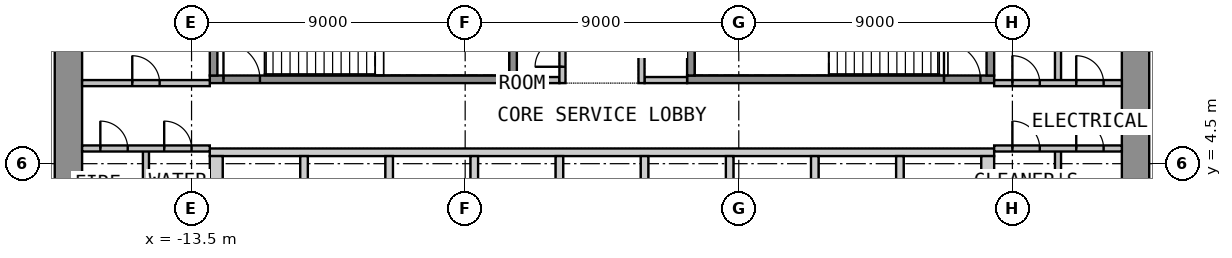
"""IFC4 building model, lengths in metres.
Left out: names, types, materials, properties, quantities, classifications, styles, units other than length and angle.
Written with IfcOpenShell. Run it as: python <this file> out.ifc"""

import sys

from ifc_helpers import new_model, si_unit, direction, frame, frame_2d, origin, place, context, subcontext, project, spatial, polyline, rectangle, outline, extrude, element, fill, save


model = new_model("IFC4")
c1 = context("Model", 3, precision=1e-05, world=origin(), true_north=direction((0.0, 1.0)))
c2 = subcontext(c1, "Body", "Model", "MODEL_VIEW")
j1 = project(units=[si_unit("LENGTHUNIT", "METRE"), si_unit("PLANEANGLEUNIT", "RADIAN")], contexts=[c1])
p1 = place(None, origin())
s1 = spatial("IfcSite", under=j1, at=p1, CompositionType="ELEMENT")
p2 = place(p1, origin())
s2 = spatial("IfcBuilding", under=s1, at=p2, CompositionType="ELEMENT")
p3 = place(p2, frame((0.0, 0.0, 6.0)))
s3 = spatial("IfcBuildingStorey", under=s2, at=p3, CompositionType="ELEMENT", Elevation=6.0)
p4 = place(p3, frame((-17.55, -12.6, 0.0), z_axis=(0.0, 0.0, 1.0), x_axis=(0.0, 1.0, 0.0)))
e1 = element("IfcWall", 1, at=p4, inside=s3, PredefinedType="SHEAR", context=c2, shape_type="SweptSolid", body=[
    extrude(rectangle(XDim=25.2, YDim=0.9, at=frame_2d((12.6, 0.0))), origin(), (0.0, 0.0, 1.0), 4.4),
])
p5 = place(p4, frame((11.4, 0.0, 0.0)))
e2 = element("IfcOpeningElement", 2, at=p5, cuts=e1, PredefinedType="OPENING", context=c2, shape_type="SweptSolid", body=[
    extrude(rectangle(XDim=2.4, YDim=2.1, at=frame_2d((1.2, 1.05))), frame((0.0, 0.46, 0.0), z_axis=(0.0, -1.0, 0.0), x_axis=(1.0, 0.0, 0.0)), (0.0, 0.0, 1.0), 0.92),
])
p6 = place(p3, frame((17.55, -12.6, 0.0), z_axis=(0.0, 0.0, 1.0), x_axis=(0.0, 1.0, 0.0)))
e3 = element("IfcWall", 3, at=p6, inside=s3, PredefinedType="SHEAR", context=c2, shape_type="SweptSolid", body=[
    extrude(rectangle(XDim=25.2, YDim=0.9, at=frame_2d((12.6, 0.0))), origin(), (0.0, 0.0, 1.0), 4.4),
])
p7 = place(p6, frame((11.4, 0.0, 0.0)))
e4 = element("IfcOpeningElement", 4, at=p7, cuts=e3, PredefinedType="OPENING", context=c2, shape_type="SweptSolid", body=[
    extrude(rectangle(XDim=2.4, YDim=2.1, at=frame_2d((1.2, 1.05))), frame((0.0, 0.46, 0.0), z_axis=(0.0, -1.0, 0.0), x_axis=(1.0, 0.0, 0.0)), (0.0, 0.0, 1.0), 0.92),
])
p8 = place(p3, origin())
e5 = element("IfcWall", 5, at=p8, inside=s3, PredefinedType="SHEAR", context=c2, shape_type="SweptSolid", body=[
    extrude(outline(polyline([(-12.9, 4.75), (12.9, 4.75), (12.9, 5.0), (-12.9, 5.0), (-12.9, 4.75)])), origin(), (0.0, 0.0, 1.0), 4.4),
])
p9 = place(p3, origin())
e6 = element("IfcWall", 6, at=p9, inside=s3, PredefinedType="SHEAR", context=c2, shape_type="SweptSolid", body=[
    extrude(outline(polyline([(-12.9, 2.05), (-12.475, 2.05), (-12.475, 4.75), (-12.9, 4.75), (-12.9, 2.05)])), origin(), (0.0, 0.0, 1.0), 4.4),
])
p10 = place(p3, origin())
e7 = element("IfcWall", 7, at=p10, inside=s3, PredefinedType="SHEAR", context=c2, shape_type="SweptSolid", body=[
    extrude(outline(polyline([(-9.925, 2.05), (-9.675, 2.05), (-9.675, 4.75), (-9.925, 4.75), (-9.925, 2.05)])), origin(), (0.0, 0.0, 1.0), 4.4),
])
p11 = place(p3, origin())
e8 = element("IfcWall", 8, at=p11, inside=s3, PredefinedType="SHEAR", context=c2, shape_type="SweptSolid", body=[
    extrude(outline(polyline([(-7.125, 2.05), (-6.875, 2.05), (-6.875, 4.75), (-7.125, 4.75), (-7.125, 2.05)])), origin(), (0.0, 0.0, 1.0), 4.4),
])
p12 = place(p3, origin())
e9 = element("IfcWall", 9, at=p12, inside=s3, PredefinedType="SHEAR", context=c2, shape_type="SweptSolid", body=[
    extrude(outline(polyline([(-4.325, 2.05), (-4.075, 2.05), (-4.075, 4.75), (-4.325, 4.75), (-4.325, 2.05)])), origin(), (0.0, 0.0, 1.0), 4.4),
])
p13 = place(p3, origin())
e10 = element("IfcWall", 10, at=p13, inside=s3, PredefinedType="SHEAR", context=c2, shape_type="SweptSolid", body=[
    extrude(outline(polyline([(-1.525, 2.05), (-1.275, 2.05), (-1.275, 4.75), (-1.525, 4.75), (-1.525, 2.05)])), origin(), (0.0, 0.0, 1.0), 4.4),
])
p14 = place(p3, origin())
e11 = element("IfcWall", 11, at=p14, inside=s3, PredefinedType="SHEAR", context=c2, shape_type="SweptSolid", body=[
    extrude(outline(polyline([(1.275, 2.05), (1.525, 2.05), (1.525, 4.75), (1.275, 4.75), (1.275, 2.05)])), origin(), (0.0, 0.0, 1.0), 4.4),
])
p15 = place(p3, origin())
e12 = element("IfcWall", 12, at=p15, inside=s3, PredefinedType="SHEAR", context=c2, shape_type="SweptSolid", body=[
    extrude(outline(polyline([(4.075, 2.05), (4.325, 2.05), (4.325, 4.75), (4.075, 4.75), (4.075, 2.05)])), origin(), (0.0, 0.0, 1.0), 4.4),
])
p16 = place(p3, origin())
e13 = element("IfcWall", 13, at=p16, inside=s3, PredefinedType="SHEAR", context=c2, shape_type="SweptSolid", body=[
    extrude(outline(polyline([(6.875, 2.05), (7.125, 2.05), (7.125, 4.75), (6.875, 4.75), (6.875, 2.05)])), origin(), (0.0, 0.0, 1.0), 4.4),
])
p17 = place(p3, origin())
e14 = element("IfcWall", 14, at=p17, inside=s3, PredefinedType="SHEAR", context=c2, shape_type="SweptSolid", body=[
    extrude(outline(polyline([(9.675, 2.05), (9.925, 2.05), (9.925, 4.75), (9.675, 4.75), (9.675, 2.05)])), origin(), (0.0, 0.0, 1.0), 4.4),
])
p18 = place(p3, origin())
e15 = element("IfcWall", 15, at=p18, inside=s3, PredefinedType="SHEAR", context=c2, shape_type="SweptSolid", body=[
    extrude(outline(polyline([(12.475, 2.05), (12.9, 2.05), (12.9, 4.75), (12.475, 4.75), (12.475, 2.05)])), origin(), (0.0, 0.0, 1.0), 4.4),
])
p19 = place(p3, frame((-12.9, 7.275, 0.0), z_axis=(0.0, 0.0, 1.0), x_axis=(1.0, 0.0, 0.0)))
e16 = element("IfcWall", 16, at=p19, inside=s3, PredefinedType="SHEAR", context=c2, shape_type="SweptSolid", body=[
    extrude(rectangle(XDim=10.1, YDim=0.25, at=frame_2d((5.05, 0.0))), origin(), (0.0, 0.0, 1.0), 4.4),
])
p20 = place(p19, frame((0.45, 0.0, 0.0)))
e17 = element("IfcOpeningElement", 17, at=p20, cuts=e16, PredefinedType="OPENING", context=c2, shape_type="SweptSolid", body=[
    extrude(rectangle(XDim=1.2, YDim=2.1, at=frame_2d((0.6, 1.05))), frame((0.0, 0.135, 0.0), z_axis=(0.0, -1.0, 0.0), x_axis=(1.0, 0.0, 0.0)), (0.0, 0.0, 1.0), 0.27),
])
for number, where, z_axis, x_axis in (
    (18, (-12.775, 7.4, 0.0), (0.0, 0.0, 1.0), (0.0, 1.0, 0.0)),
    (19, (-2.925, 7.4, 0.0), (0.0, 0.0, 1.0), (0.0, 1.0, 0.0)),
):
    element("IfcWall", number, at=place(p3, frame(where, z_axis=z_axis, x_axis=x_axis)), inside=s3, PredefinedType="SHEAR", context=c2, shape_type="SweptSolid", body=[
        extrude(rectangle(XDim=3.25, YDim=0.25, at=frame_2d((1.625, 0.0))), origin(), (0.0, 0.0, 1.0), 4.4),
    ])
p21 = place(p3, frame((2.8, 7.275, 0.0), z_axis=(0.0, 0.0, 1.0), x_axis=(1.0, 0.0, 0.0)))
e20 = element("IfcWall", 20, at=p21, inside=s3, PredefinedType="SHEAR", context=c2, shape_type="SweptSolid", body=[
    extrude(rectangle(XDim=10.1, YDim=0.25, at=frame_2d((5.05, 0.0))), origin(), (0.0, 0.0, 1.0), 4.4),
])
p22 = place(p21, frame((8.45, 0.0, 0.0)))
e21 = element("IfcOpeningElement", 21, at=p22, cuts=e20, PredefinedType="OPENING", context=c2, shape_type="SweptSolid", body=[
    extrude(rectangle(XDim=1.2, YDim=2.1, at=frame_2d((0.6, 1.05))), frame((0.0, 0.135, 0.0), z_axis=(0.0, -1.0, 0.0), x_axis=(1.0, 0.0, 0.0)), (0.0, 0.0, 1.0), 0.27),
])
for number, where, z_axis, x_axis in (
    (22, (2.925, 7.4, 0.0), (0.0, 0.0, 1.0), (0.0, 1.0, 0.0)),
    (23, (12.775, 7.4, 0.0), (0.0, 0.0, 1.0), (0.0, 1.0, 0.0)),
):
    element("IfcWall", number, at=place(p3, frame(where, z_axis=z_axis, x_axis=x_axis)), inside=s3, PredefinedType="SHEAR", context=c2, shape_type="SweptSolid", body=[
        extrude(rectangle(XDim=3.25, YDim=0.25, at=frame_2d((1.625, 0.0))), origin(), (0.0, 0.0, 1.0), 4.4),
    ])
for number, where, z_axis, x_axis in (
    (24, (-2.8, 7.25, 0.0), (0.0, 0.0, 1.0), (1.0, 0.0, 0.0)),
    (25, (1.4, 7.25, 0.0), (0.0, 0.0, 1.0), (1.0, 0.0, 0.0)),
):
    element("IfcWall", number, at=place(p3, frame(where, z_axis=z_axis, x_axis=x_axis)), inside=s3, PredefinedType="PARTITIONING", context=c2, shape_type="SweptSolid", body=[
        extrude(rectangle(XDim=1.4, YDim=0.2, at=frame_2d((0.7, 0.0))), origin(), (0.0, 0.0, 1.0), 4.4),
    ])
p23 = place(p3, frame((-1.3, 7.15, 0.0), z_axis=(0.0, 0.0, 1.0), x_axis=(0.0, 1.0, 0.0)))
e26 = element("IfcWall", 26, at=p23, inside=s3, PredefinedType="PARTITIONING", context=c2, shape_type="SweptSolid", body=[
    extrude(rectangle(XDim=5.45, YDim=0.2, at=frame_2d((2.725, 0.0))), origin(), (0.0, 0.0, 1.0), 4.4),
])
p24 = place(p23, frame((0.538, 0.0, 0.0)))
e27 = element("IfcOpeningElement", 27, at=p24, cuts=e26, PredefinedType="OPENING", context=c2, shape_type="SweptSolid", body=[
    extrude(rectangle(XDim=0.9, YDim=2.1, at=frame_2d((0.45, 1.05))), frame((0.0, 0.11, 0.0), z_axis=(0.0, -1.0, 0.0), x_axis=(1.0, 0.0, 0.0)), (0.0, 0.0, 1.0), 0.22),
])
p25 = place(p23, frame((3.163, 0.0, 0.0)))
e28 = element("IfcOpeningElement", 28, at=p25, cuts=e26, PredefinedType="OPENING", context=c2, shape_type="SweptSolid", body=[
    extrude(rectangle(XDim=0.9, YDim=2.1, at=frame_2d((0.45, 1.05))), frame((0.0, 0.11, 0.0), z_axis=(0.0, -1.0, 0.0), x_axis=(1.0, 0.0, 0.0)), (0.0, 0.0, 1.0), 0.22),
])
p26 = place(p3, frame((1.3, 7.15, 0.0), z_axis=(0.0, 0.0, 1.0), x_axis=(0.0, 1.0, 0.0)))
e29 = element("IfcWall", 29, at=p26, inside=s3, PredefinedType="PARTITIONING", context=c2, shape_type="SweptSolid", body=[
    extrude(rectangle(XDim=5.45, YDim=0.2, at=frame_2d((2.725, 0.0))), origin(), (0.0, 0.0, 1.0), 4.4),
])
p27 = place(p26, frame((2.375, 0.0, 0.0)))
e30 = element("IfcOpeningElement", 30, at=p27, cuts=e29, PredefinedType="OPENING", context=c2, shape_type="SweptSolid", body=[
    extrude(rectangle(XDim=0.9, YDim=2.1, at=frame_2d((0.45, 1.05))), frame((0.0, 0.11, 0.0), z_axis=(0.0, -1.0, 0.0), x_axis=(1.0, 0.0, 0.0)), (0.0, 0.0, 1.0), 0.22),
])
p28 = place(p3, frame((-17.1, 7.15, 0.0), z_axis=(0.0, 0.0, 1.0), x_axis=(1.0, 0.0, 0.0)))
e31 = element("IfcWall", 31, at=p28, inside=s3, PredefinedType="PARTITIONING", context=c2, shape_type="SweptSolid", body=[
    extrude(rectangle(XDim=4.2, YDim=0.2, at=frame_2d((2.1, 0.0))), origin(), (0.0, 0.0, 1.0), 4.4),
])
p29 = place(p28, frame((1.65, 0.0, 0.0)))
e32 = element("IfcOpeningElement", 32, at=p29, cuts=e31, PredefinedType="OPENING", context=c2, shape_type="SweptSolid", body=[
    extrude(rectangle(XDim=0.9, YDim=2.1, at=frame_2d((0.45, 1.05))), frame((0.0, 0.11, 0.0), z_axis=(0.0, -1.0, 0.0), x_axis=(1.0, 0.0, 0.0)), (0.0, 0.0, 1.0), 0.22),
])
p30 = place(p3, frame((-15.0, 1.8, 0.0), z_axis=(0.0, 0.0, 1.0), x_axis=(0.0, 1.0, 0.0)))
e33 = element("IfcWall", 33, at=p30, inside=s3, PredefinedType="PARTITIONING", context=c2, shape_type="SweptSolid", body=[
    extrude(rectangle(XDim=3.2, YDim=0.2, at=frame_2d((1.6, 0.0))), origin(), (0.0, 0.0, 1.0), 4.4),
])
p31 = place(p3, frame((-17.1, 5.0, 0.0), z_axis=(0.0, 0.0, 1.0), x_axis=(1.0, 0.0, 0.0)))
e34 = element("IfcWall", 34, at=p31, inside=s3, PredefinedType="PARTITIONING", context=c2, shape_type="SweptSolid", body=[
    extrude(rectangle(XDim=4.2, YDim=0.2, at=frame_2d((2.1, 0.0))), origin(), (0.0, 0.0, 1.0), 4.4),
])
p32 = place(p31, frame((0.6, 0.0, 0.0)))
e35 = element("IfcOpeningElement", 35, at=p32, cuts=e34, PredefinedType="OPENING", context=c2, shape_type="SweptSolid", body=[
    extrude(rectangle(XDim=0.9, YDim=2.1, at=frame_2d((0.45, 1.05))), frame((0.0, 0.11, 0.0), z_axis=(0.0, -1.0, 0.0), x_axis=(1.0, 0.0, 0.0)), (0.0, 0.0, 1.0), 0.22),
])
p33 = place(p31, frame((2.7, 0.0, 0.0)))
e36 = element("IfcOpeningElement", 36, at=p33, cuts=e34, PredefinedType="OPENING", context=c2, shape_type="SweptSolid", body=[
    extrude(rectangle(XDim=0.9, YDim=2.1, at=frame_2d((0.45, 1.05))), frame((0.0, 0.11, 0.0), z_axis=(0.0, -1.0, 0.0), x_axis=(1.0, 0.0, 0.0)), (0.0, 0.0, 1.0), 0.22),
])
p34 = place(p3, frame((15.0, 7.15, 0.0), z_axis=(0.0, 0.0, 1.0), x_axis=(0.0, 1.0, 0.0)))
e37 = element("IfcWall", 37, at=p34, inside=s3, PredefinedType="PARTITIONING", context=c2, shape_type="SweptSolid", body=[
    extrude(rectangle(XDim=5.45, YDim=0.2, at=frame_2d((2.725, 0.0))), origin(), (0.0, 0.0, 1.0), 4.4),
])
p35 = place(p3, frame((12.9, 7.15, 0.0), z_axis=(0.0, 0.0, 1.0), x_axis=(1.0, 0.0, 0.0)))
e38 = element("IfcWall", 38, at=p35, inside=s3, PredefinedType="PARTITIONING", context=c2, shape_type="SweptSolid", body=[
    extrude(rectangle(XDim=4.2, YDim=0.2, at=frame_2d((2.1, 0.0))), origin(), (0.0, 0.0, 1.0), 4.4),
])
p36 = place(p35, frame((0.6, 0.0, 0.0)))
e39 = element("IfcOpeningElement", 39, at=p36, cuts=e38, PredefinedType="OPENING", context=c2, shape_type="SweptSolid", body=[
    extrude(rectangle(XDim=0.9, YDim=2.1, at=frame_2d((0.45, 1.05))), frame((0.0, 0.11, 0.0), z_axis=(0.0, -1.0, 0.0), x_axis=(1.0, 0.0, 0.0)), (0.0, 0.0, 1.0), 0.22),
])
p37 = place(p35, frame((2.7, 0.0, 0.0)))
e40 = element("IfcOpeningElement", 40, at=p37, cuts=e38, PredefinedType="OPENING", context=c2, shape_type="SweptSolid", body=[
    extrude(rectangle(XDim=0.9, YDim=2.1, at=frame_2d((0.45, 1.05))), frame((0.0, 0.11, 0.0), z_axis=(0.0, -1.0, 0.0), x_axis=(1.0, 0.0, 0.0)), (0.0, 0.0, 1.0), 0.22),
])
p38 = place(p3, frame((15.0, 1.8, 0.0), z_axis=(0.0, 0.0, 1.0), x_axis=(0.0, 1.0, 0.0)))
e41 = element("IfcWall", 41, at=p38, inside=s3, PredefinedType="PARTITIONING", context=c2, shape_type="SweptSolid", body=[
    extrude(rectangle(XDim=3.2, YDim=0.2, at=frame_2d((1.6, 0.0))), origin(), (0.0, 0.0, 1.0), 4.4),
])
p39 = place(p3, frame((12.9, 5.0, 0.0), z_axis=(0.0, 0.0, 1.0), x_axis=(1.0, 0.0, 0.0)))
e42 = element("IfcWall", 42, at=p39, inside=s3, PredefinedType="PARTITIONING", context=c2, shape_type="SweptSolid", body=[
    extrude(rectangle(XDim=4.2, YDim=0.2, at=frame_2d((2.1, 0.0))), origin(), (0.0, 0.0, 1.0), 4.4),
])
p40 = place(p39, frame((0.6, 0.0, 0.0)))
e43 = element("IfcOpeningElement", 43, at=p40, cuts=e42, PredefinedType="OPENING", context=c2, shape_type="SweptSolid", body=[
    extrude(rectangle(XDim=0.9, YDim=2.1, at=frame_2d((0.45, 1.05))), frame((0.0, 0.11, 0.0), z_axis=(0.0, -1.0, 0.0), x_axis=(1.0, 0.0, 0.0)), (0.0, 0.0, 1.0), 0.22),
])
p41 = place(p39, frame((2.7, 0.0, 0.0)))
e44 = element("IfcOpeningElement", 44, at=p41, cuts=e42, PredefinedType="OPENING", context=c2, shape_type="SweptSolid", body=[
    extrude(rectangle(XDim=0.9, YDim=2.1, at=frame_2d((0.45, 1.05))), frame((0.0, 0.11, 0.0), z_axis=(0.0, -1.0, 0.0), x_axis=(1.0, 0.0, 0.0)), (0.0, 0.0, 1.0), 0.22),
])
p42 = place(p20, origin())
e45 = element("IfcDoor", 45, at=p42, inside=s3, OperationType="SINGLE_SWING_LEFT", PredefinedType="DOOR", context=c2, shape_type="SweptSolid", body=[
    extrude(rectangle(XDim=1.2, YDim=2.1, at=frame_2d((0.6, 1.05))), frame((0.0, 0.025, 0.0), z_axis=(0.0, -1.0, 0.0), x_axis=(1.0, 0.0, 0.0)), (0.0, 0.0, 1.0), 0.05),
])
fill(e17, e45)
p43 = place(p22, origin())
e46 = element("IfcDoor", 46, at=p43, inside=s3, OperationType="SINGLE_SWING_LEFT", PredefinedType="DOOR", context=c2, shape_type="SweptSolid", body=[
    extrude(rectangle(XDim=1.2, YDim=2.1, at=frame_2d((0.6, 1.05))), frame((0.0, 0.025, 0.0), z_axis=(0.0, -1.0, 0.0), x_axis=(1.0, 0.0, 0.0)), (0.0, 0.0, 1.0), 0.05),
])
fill(e21, e46)
p44 = place(p24, origin())
e47 = element("IfcDoor", 47, at=p44, inside=s3, OperationType="SINGLE_SWING_LEFT", PredefinedType="DOOR", context=c2, shape_type="SweptSolid", body=[
    extrude(rectangle(XDim=0.9, YDim=2.1, at=frame_2d((0.45, 1.05))), frame((0.0, 0.025, 0.0), z_axis=(0.0, -1.0, 0.0), x_axis=(1.0, 0.0, 0.0)), (0.0, 0.0, 1.0), 0.05),
])
fill(e27, e47)
p45 = place(p29, origin())
e48 = element("IfcDoor", 48, at=p45, inside=s3, OperationType="SINGLE_SWING_LEFT", PredefinedType="DOOR", context=c2, shape_type="SweptSolid", body=[
    extrude(rectangle(XDim=0.9, YDim=2.1, at=frame_2d((0.45, 1.05))), frame((0.0, 0.025, 0.0), z_axis=(0.0, -1.0, 0.0), x_axis=(1.0, 0.0, 0.0)), (0.0, 0.0, 1.0), 0.05),
])
fill(e32, e48)
p46 = place(p32, origin())
e49 = element("IfcDoor", 49, at=p46, inside=s3, OperationType="SINGLE_SWING_LEFT", PredefinedType="DOOR", context=c2, shape_type="SweptSolid", body=[
    extrude(rectangle(XDim=0.9, YDim=2.1, at=frame_2d((0.45, 1.05))), frame((0.0, 0.025, 0.0), z_axis=(0.0, -1.0, 0.0), x_axis=(1.0, 0.0, 0.0)), (0.0, 0.0, 1.0), 0.05),
])
fill(e35, e49)
p47 = place(p33, origin())
e50 = element("IfcDoor", 50, at=p47, inside=s3, OperationType="SINGLE_SWING_LEFT", PredefinedType="DOOR", context=c2, shape_type="SweptSolid", body=[
    extrude(rectangle(XDim=0.9, YDim=2.1, at=frame_2d((0.45, 1.05))), frame((0.0, 0.025, 0.0), z_axis=(0.0, -1.0, 0.0), x_axis=(1.0, 0.0, 0.0)), (0.0, 0.0, 1.0), 0.05),
])
fill(e36, e50)
p48 = place(p36, origin())
e51 = element("IfcDoor", 51, at=p48, inside=s3, OperationType="SINGLE_SWING_LEFT", PredefinedType="DOOR", context=c2, shape_type="SweptSolid", body=[
    extrude(rectangle(XDim=0.9, YDim=2.1, at=frame_2d((0.45, 1.05))), frame((0.0, 0.025, 0.0), z_axis=(0.0, -1.0, 0.0), x_axis=(1.0, 0.0, 0.0)), (0.0, 0.0, 1.0), 0.05),
])
fill(e39, e51)
p49 = place(p37, origin())
e52 = element("IfcDoor", 52, at=p49, inside=s3, OperationType="SINGLE_SWING_LEFT", PredefinedType="DOOR", context=c2, shape_type="SweptSolid", body=[
    extrude(rectangle(XDim=0.9, YDim=2.1, at=frame_2d((0.45, 1.05))), frame((0.0, 0.025, 0.0), z_axis=(0.0, -1.0, 0.0), x_axis=(1.0, 0.0, 0.0)), (0.0, 0.0, 1.0), 0.05),
])
fill(e40, e52)
p50 = place(p40, origin())
e53 = element("IfcDoor", 53, at=p50, inside=s3, OperationType="SINGLE_SWING_LEFT", PredefinedType="DOOR", context=c2, shape_type="SweptSolid", body=[
    extrude(rectangle(XDim=0.9, YDim=2.1, at=frame_2d((0.45, 1.05))), frame((0.0, 0.025, 0.0), z_axis=(0.0, -1.0, 0.0), x_axis=(1.0, 0.0, 0.0)), (0.0, 0.0, 1.0), 0.05),
])
fill(e43, e53)
p51 = place(p41, origin())
e54 = element("IfcDoor", 54, at=p51, inside=s3, OperationType="SINGLE_SWING_LEFT", PredefinedType="DOOR", context=c2, shape_type="SweptSolid", body=[
    extrude(rectangle(XDim=0.9, YDim=2.1, at=frame_2d((0.45, 1.05))), frame((0.0, 0.025, 0.0), z_axis=(0.0, -1.0, 0.0), x_axis=(1.0, 0.0, 0.0)), (0.0, 0.0, 1.0), 0.05),
])
fill(e44, e54)
save(model, sys.argv[1])
